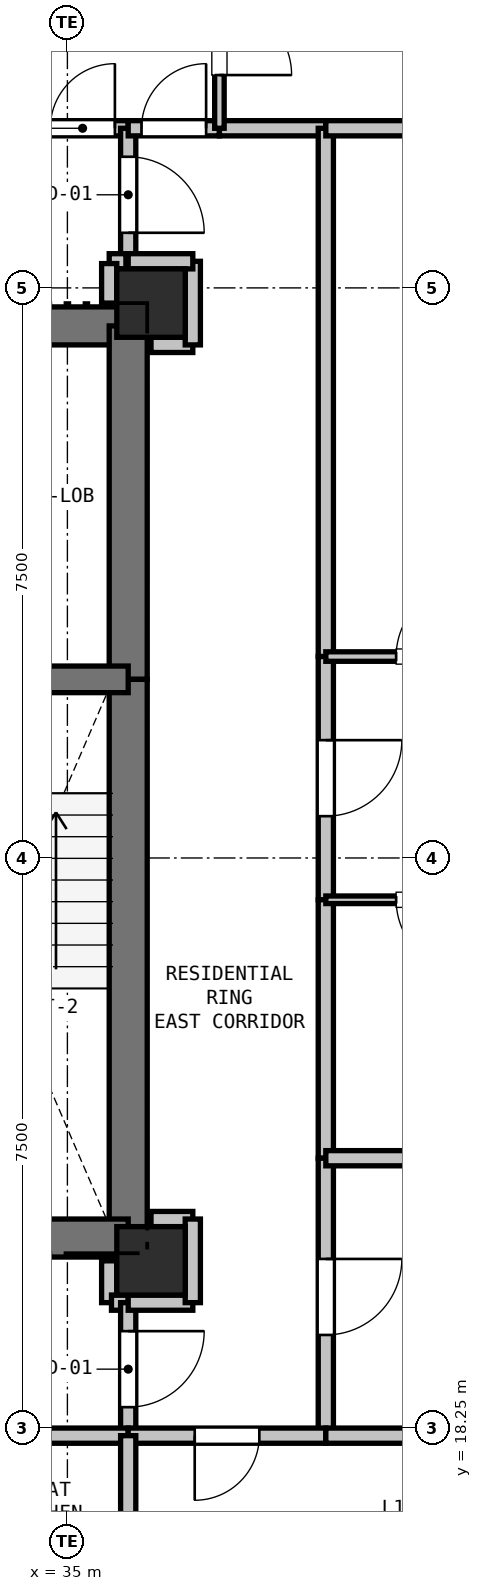
"""IFC4 building model, lengths in metres.
Left out: names, types, materials, properties, quantities, classifications, styles, units other than length and angle.
Written with IfcOpenShell. Run it as: python <this file> out.ifc"""

import sys

from ifc_helpers import new_model, si_unit, direction, frame, frame_2d, origin, origin_2d, place, context, subcontext, project, spatial, rectangle, extrude, element, fill, save


model = new_model("IFC4")
c1 = context("Model", 3, precision=1e-05, world=origin(), true_north=direction((0.0, 1.0)))
c2 = subcontext(c1, "Body", "Model", "MODEL_VIEW")
j1 = project(units=[si_unit("LENGTHUNIT", "METRE"), si_unit("PLANEANGLEUNIT", "RADIAN")], contexts=[c1])
p1 = place(None, origin())
s1 = spatial("IfcSite", under=j1, at=p1, CompositionType="ELEMENT")
p2 = place(p1, origin())
s2 = spatial("IfcBuilding", under=s1, at=p2, CompositionType="ELEMENT")
p3 = place(p2, frame((0.0, 0.0, 52.2)))
s3 = spatial("IfcBuildingStorey", under=s2, at=p3, CompositionType="ELEMENT", Elevation=52.2)
for number, where, z_axis, x_axis in (
    (1, (36.1, 33.05, 0.0), (0.0, 0.0, 1.0), (1.0, 0.0, 0.0)),
    (2, (36.1, 20.45, 0.0), (0.0, 0.0, 1.0), (1.0, 0.0, 0.0)),
):
    element("IfcColumn", number, at=place(p3, frame(where, z_axis=z_axis, x_axis=x_axis)), inside=s3, PredefinedType="COLUMN", context=c2, shape_type="SweptSolid", body=[
        extrude(rectangle(XDim=0.9, YDim=0.9, at=origin_2d()), origin(), (0.0, 0.0, 1.0), 3.3),
    ])
p4 = place(p3, frame((32.35, 32.75, 0.0), z_axis=(0.0, 0.0, 1.0), x_axis=(1.0, 0.0, 0.0)))
e3 = element("IfcWall", 3, at=p4, inside=s3, PredefinedType="SHEAR", context=c2, shape_type="SweptSolid", body=[
    extrude(rectangle(XDim=3.45, YDim=0.5, at=frame_2d((1.725, 0.0))), origin(), (0.0, 0.0, 1.0), 3.04),
])
p5 = place(p4, frame((0.65, 0.0, 0.0)))
e4 = element("IfcOpeningElement", 4, at=p5, cuts=e3, PredefinedType="OPENING", context=c2, shape_type="SweptSolid", body=[
    extrude(rectangle(XDim=1.15, YDim=2.15, at=frame_2d((0.575, 1.075))), frame((0.0, 0.26, 0.0), z_axis=(0.0, -1.0, 0.0), x_axis=(1.0, 0.0, 0.0)), (0.0, 0.0, 1.0), 0.52),
])
p6 = place(p3, frame((35.8, 32.75, 0.0), z_axis=(0.0, 0.0, 1.0), x_axis=(0.0, -1.0, 0.0)))
e5 = element("IfcWall", 5, at=p6, inside=s3, PredefinedType="SHEAR", context=c2, shape_type="SweptSolid", body=[
    extrude(rectangle(XDim=4.65, YDim=0.5, at=frame_2d((2.325, 0.0))), origin(), (0.0, 0.0, 1.0), 3.04),
])
p7 = place(p3, frame((35.8, 28.1, 0.0), z_axis=(0.0, 0.0, 1.0), x_axis=(0.0, -1.0, 0.0)))
e6 = element("IfcWall", 6, at=p7, inside=s3, PredefinedType="SHEAR", context=c2, shape_type="SweptSolid", body=[
    extrude(rectangle(XDim=7.35, YDim=0.5, at=frame_2d((3.675, 0.0))), origin(), (0.0, 0.0, 1.0), 3.04),
])
p8 = place(p3, frame((35.8, 20.75, 0.0), z_axis=(0.0, 0.0, 1.0), x_axis=(-1.0, 0.0, 0.0)))
e7 = element("IfcWall", 7, at=p8, inside=s3, PredefinedType="SHEAR", context=c2, shape_type="SweptSolid", body=[
    extrude(rectangle(XDim=3.45, YDim=0.5, at=frame_2d((1.725, 0.0))), origin(), (0.0, 0.0, 1.0), 3.04),
])
p9 = place(p3, frame((32.35, 28.1, 0.0), z_axis=(0.0, 0.0, 1.0), x_axis=(1.0, 0.0, 0.0)))
e8 = element("IfcWall", 8, at=p9, inside=s3, PredefinedType="SHEAR", context=c2, shape_type="SweptSolid", body=[
    extrude(rectangle(XDim=3.45, YDim=0.35, at=frame_2d((1.725, 0.0))), origin(), (0.0, 0.0, 1.0), 3.04),
])
p10 = place(p9, frame((1.15, 0.0, 0.0)))
e9 = element("IfcOpeningElement", 9, at=p10, cuts=e8, PredefinedType="OPENING", context=c2, shape_type="SweptSolid", body=[
    extrude(rectangle(XDim=1.15, YDim=2.15, at=frame_2d((0.575, 1.075))), frame((0.0, 0.185, 0.0), z_axis=(0.0, -1.0, 0.0), x_axis=(1.0, 0.0, 0.0)), (0.0, 0.0, 1.0), 0.37),
])
p11 = place(p3, frame((35.55, 20.45, 0.0), z_axis=(0.0, 0.0, 1.0), x_axis=(0.0, -1.0, 0.0)))
e10 = element("IfcWall", 10, at=p11, inside=s3, PredefinedType="PARTITIONING", context=c2, shape_type="SweptSolid", body=[
    extrude(rectangle(XDim=0.55, YDim=0.2, at=frame_2d((0.275, 0.0))), origin(), (0.0, 0.0, 1.0), 2.488),
])
p12 = place(p3, frame((35.58, 19.9, 0.0), z_axis=(0.0, 0.0, 1.0), x_axis=(1.0, 0.0, 0.0)))
e11 = element("IfcWall", 11, at=p12, inside=s3, PredefinedType="PARTITIONING", context=c2, shape_type="SweptSolid", body=[
    extrude(rectangle(XDim=0.22, YDim=0.2, at=frame_2d((0.11, 0.0))), origin(), (0.0, 0.0, 1.0), 3.04),
])
p13 = place(p3, frame((35.8, 19.9, 0.0), z_axis=(0.0, 0.0, 1.0), x_axis=(0.0, -1.0, 0.0)))
e12 = element("IfcWall", 12, at=p13, inside=s3, PredefinedType="PARTITIONING", context=c2, shape_type="SweptSolid", body=[
    extrude(rectangle(XDim=1.75, YDim=0.2, at=frame_2d((0.875, 0.0))), origin(), (0.0, 0.0, 1.0), 3.04),
])
p14 = place(p13, frame((0.375, 0.0, 0.0)))
e13 = element("IfcOpeningElement", 13, at=p14, cuts=e12, PredefinedType="OPENING", context=c2, shape_type="SweptSolid", body=[
    extrude(rectangle(XDim=1.0, YDim=2.15, at=frame_2d((0.5, 1.075))), frame((0.0, 0.11, 0.0), z_axis=(0.0, -1.0, 0.0), x_axis=(1.0, 0.0, 0.0)), (0.0, 0.0, 1.0), 0.22),
])
p15 = place(p3, frame((35.8, 18.15, 0.0), z_axis=(0.0, 0.0, 1.0), x_axis=(-1.0, 0.0, 0.0)))
e14 = element("IfcWall", 14, at=p15, inside=s3, PredefinedType="PARTITIONING", context=c2, shape_type="SweptSolid", body=[
    extrude(rectangle(XDim=3.6, YDim=0.2, at=frame_2d((1.8, 0.0))), origin(), (0.0, 0.0, 1.0), 3.04),
])
p16 = place(p3, frame((34.6, 35.35, 0.0), z_axis=(0.0, 0.0, 1.0), x_axis=(1.0, 0.0, 0.0)))
e15 = element("IfcWall", 15, at=p16, inside=s3, PredefinedType="PARTITIONING", context=c2, shape_type="SweptSolid", body=[
    extrude(rectangle(XDim=1.2, YDim=0.2, at=frame_2d((0.6, 0.0))), origin(), (0.0, 0.0, 1.0), 3.04),
])
p17 = place(p16, frame((0.175, 0.0, 0.0)))
e16 = element("IfcOpeningElement", 16, at=p17, cuts=e15, PredefinedType="OPENING", context=c2, shape_type="SweptSolid", body=[
    extrude(rectangle(XDim=0.85, YDim=2.1, at=frame_2d((0.425, 1.05))), frame((0.0, 0.11, 0.0), z_axis=(0.0, -1.0, 0.0), x_axis=(1.0, 0.0, 0.0)), (0.0, 0.0, 1.0), 0.22),
])
p18 = place(p3, frame((35.8, 35.35, 0.0), z_axis=(0.0, 0.0, 1.0), x_axis=(0.0, -1.0, 0.0)))
e17 = element("IfcWall", 17, at=p18, inside=s3, PredefinedType="PARTITIONING", context=c2, shape_type="SweptSolid", body=[
    extrude(rectangle(XDim=1.75, YDim=0.2, at=frame_2d((0.875, 0.0))), origin(), (0.0, 0.0, 1.0), 3.04),
])
p19 = place(p18, frame((0.375, 0.0, 0.0)))
e18 = element("IfcOpeningElement", 18, at=p19, cuts=e17, PredefinedType="OPENING", context=c2, shape_type="SweptSolid", body=[
    extrude(rectangle(XDim=1.0, YDim=2.15, at=frame_2d((0.5, 1.075))), frame((0.0, 0.11, 0.0), z_axis=(0.0, -1.0, 0.0), x_axis=(1.0, 0.0, 0.0)), (0.0, 0.0, 1.0), 0.22),
])
p20 = place(p3, frame((35.77, 33.6, 0.0), z_axis=(0.0, 0.0, 1.0), x_axis=(-1.0, 0.0, 0.0)))
e19 = element("IfcWall", 19, at=p20, inside=s3, PredefinedType="PARTITIONING", context=c2, shape_type="SweptSolid", body=[
    extrude(rectangle(XDim=0.22, YDim=0.2, at=frame_2d((0.11, 0.0))), origin(), (0.0, 0.0, 1.0), 3.04),
])
p21 = place(p3, frame((35.55, 33.57, 0.0), z_axis=(0.0, 0.0, 1.0), x_axis=(0.0, -1.0, 0.0)))
e20 = element("IfcWall", 20, at=p21, inside=s3, PredefinedType="PARTITIONING", context=c2, shape_type="SweptSolid", body=[
    extrude(rectangle(XDim=0.52, YDim=0.2, at=frame_2d((0.26, 0.0))), origin(), (0.0, 0.0, 1.0), 2.488),
])
for number, where, z_axis, x_axis in (
    (21, (36.65, 21.0, 0.0), (0.0, 0.0, 1.0), (-1.0, 0.0, 0.0)),
    (22, (36.1, 32.5, 0.0), (0.0, 0.0, 1.0), (1.0, 0.0, 0.0)),
):
    element("IfcWall", number, at=place(p3, frame(where, z_axis=z_axis, x_axis=x_axis)), inside=s3, PredefinedType="PARTITIONING", context=c2, shape_type="SweptSolid", body=[
        extrude(rectangle(XDim=0.55, YDim=0.2, at=frame_2d((0.275, 0.0))), origin(), (0.0, 0.0, 1.0), 2.488),
    ])
p22 = place(p3, frame((36.65, 32.5, 0.0), z_axis=(0.0, 0.0, 1.0), x_axis=(0.0, 1.0, 0.0)))
e23 = element("IfcWall", 23, at=p22, inside=s3, PredefinedType="PARTITIONING", context=c2, shape_type="SweptSolid", body=[
    extrude(rectangle(XDim=1.1, YDim=0.2, at=frame_2d((0.55, 0.0))), origin(), (0.0, 0.0, 1.0), 2.338),
])
p23 = place(p3, frame((36.65, 33.6, 0.0), z_axis=(0.0, 0.0, 1.0), x_axis=(-1.0, 0.0, 0.0)))
e24 = element("IfcWall", 24, at=p23, inside=s3, PredefinedType="PARTITIONING", context=c2, shape_type="SweptSolid", body=[
    extrude(rectangle(XDim=0.85, YDim=0.2, at=frame_2d((0.425, 0.0))), origin(), (0.0, 0.0, 1.0), 2.338),
])
p24 = place(p3, frame((35.8, 35.35, 0.0), z_axis=(0.0, 0.0, 1.0), x_axis=(1.0, 0.0, 0.0)))
e25 = element("IfcWall", 25, at=p24, inside=s3, PredefinedType="PARTITIONING", context=c2, shape_type="SweptSolid", body=[
    extrude(rectangle(XDim=1.2, YDim=0.2, at=frame_2d((0.6, 0.0))), origin(), (0.0, 0.0, 1.0), 2.338),
])
p25 = place(p24, frame((0.175, 0.0, 0.0)))
e26 = element("IfcOpeningElement", 26, at=p25, cuts=e25, PredefinedType="OPENING", context=c2, shape_type="SweptSolid", body=[
    extrude(rectangle(XDim=0.85, YDim=2.1, at=frame_2d((0.425, 1.05))), frame((0.0, 0.11, 0.0), z_axis=(0.0, -1.0, 0.0), x_axis=(1.0, 0.0, 0.0)), (0.0, 0.0, 1.0), 0.22),
])
p26 = place(p3, frame((37.0, 35.35, 0.0), z_axis=(0.0, 0.0, 1.0), x_axis=(1.0, 0.0, 0.0)))
e27 = element("IfcWall", 27, at=p26, inside=s3, PredefinedType="PARTITIONING", context=c2, shape_type="SweptSolid", body=[
    extrude(rectangle(XDim=1.4, YDim=0.2, at=frame_2d((0.7, 0.0))), origin(), (0.0, 0.0, 1.0), 2.338),
])
p27 = place(p3, frame((38.4, 35.35, 0.0), z_axis=(0.0, 0.0, 1.0), x_axis=(0.0, -1.0, 0.0)))
e28 = element("IfcWall", 28, at=p27, inside=s3, PredefinedType="PARTITIONING", context=c2, shape_type="SweptSolid", body=[
    extrude(rectangle(XDim=6.95, YDim=0.2, at=frame_2d((3.475, 0.0))), origin(), (0.0, 0.0, 1.0), 2.338),
])
p28 = place(p3, frame((38.4, 28.4, 0.0), z_axis=(0.0, 0.0, 1.0), x_axis=(0.0, -1.0, 0.0)))
e29 = element("IfcWall", 29, at=p28, inside=s3, PredefinedType="PARTITIONING", context=c2, shape_type="SweptSolid", body=[
    extrude(rectangle(XDim=3.2, YDim=0.2, at=frame_2d((1.6, 0.0))), origin(), (0.0, 0.0, 1.0), 3.04),
])
p29 = place(p28, frame((1.1, 0.0, 0.0)))
e30 = element("IfcOpeningElement", 30, at=p29, cuts=e29, PredefinedType="OPENING", context=c2, shape_type="SweptSolid", body=[
    extrude(rectangle(XDim=1.0, YDim=2.15, at=frame_2d((0.5, 1.075))), frame((0.0, 0.11, 0.0), z_axis=(0.0, -1.0, 0.0), x_axis=(1.0, 0.0, 0.0)), (0.0, 0.0, 1.0), 0.22),
])
p30 = place(p3, frame((38.4, 25.2, 0.0), z_axis=(0.0, 0.0, 1.0), x_axis=(0.0, -1.0, 0.0)))
e31 = element("IfcWall", 31, at=p30, inside=s3, PredefinedType="PARTITIONING", context=c2, shape_type="SweptSolid", body=[
    extrude(rectangle(XDim=3.4, YDim=0.2, at=frame_2d((1.7, 0.0))), origin(), (0.0, 0.0, 1.0), 3.04),
])
p31 = place(p3, frame((38.4, 21.8, 0.0), z_axis=(0.0, 0.0, 1.0), x_axis=(0.0, -1.0, 0.0)))
e32 = element("IfcWall", 32, at=p31, inside=s3, PredefinedType="PARTITIONING", context=c2, shape_type="SweptSolid", body=[
    extrude(rectangle(XDim=3.65, YDim=0.2, at=frame_2d((1.825, 0.0))), origin(), (0.0, 0.0, 1.0), 3.04),
])
p32 = place(p31, frame((1.325, 0.0, 0.0)))
e33 = element("IfcOpeningElement", 33, at=p32, cuts=e32, PredefinedType="OPENING", context=c2, shape_type="SweptSolid", body=[
    extrude(rectangle(XDim=1.0, YDim=2.15, at=frame_2d((0.5, 1.075))), frame((0.0, 0.11, 0.0), z_axis=(0.0, -1.0, 0.0), x_axis=(1.0, 0.0, 0.0)), (0.0, 0.0, 1.0), 0.22),
])
p33 = place(p3, frame((38.4, 18.15, 0.0), z_axis=(0.0, 0.0, 1.0), x_axis=(-1.0, 0.0, 0.0)))
e34 = element("IfcWall", 34, at=p33, inside=s3, PredefinedType="PARTITIONING", context=c2, shape_type="SweptSolid", body=[
    extrude(rectangle(XDim=2.6, YDim=0.2, at=frame_2d((1.3, 0.0))), origin(), (0.0, 0.0, 1.0), 2.338),
])
p34 = place(p33, frame((0.875, 0.0, 0.0)))
e35 = element("IfcOpeningElement", 35, at=p34, cuts=e34, PredefinedType="OPENING", context=c2, shape_type="SweptSolid", body=[
    extrude(rectangle(XDim=0.85, YDim=2.1, at=frame_2d((0.425, 1.05))), frame((0.0, 0.11, 0.0), z_axis=(0.0, -1.0, 0.0), x_axis=(1.0, 0.0, 0.0)), (0.0, 0.0, 1.0), 0.22),
])
p35 = place(p3, frame((35.8, 19.9, 0.0), z_axis=(0.0, 0.0, 1.0), x_axis=(1.0, 0.0, 0.0)))
e36 = element("IfcWall", 36, at=p35, inside=s3, PredefinedType="PARTITIONING", context=c2, shape_type="SweptSolid", body=[
    extrude(rectangle(XDim=0.85, YDim=0.2, at=frame_2d((0.425, 0.0))), origin(), (0.0, 0.0, 1.0), 2.338),
])
p36 = place(p3, frame((36.65, 19.9, 0.0), z_axis=(0.0, 0.0, 1.0), x_axis=(0.0, 1.0, 0.0)))
e37 = element("IfcWall", 37, at=p36, inside=s3, PredefinedType="PARTITIONING", context=c2, shape_type="SweptSolid", body=[
    extrude(rectangle(XDim=1.1, YDim=0.2, at=frame_2d((0.55, 0.0))), origin(), (0.0, 0.0, 1.0), 3.04),
])
p37 = place(p3, frame((37.0, 37.7, 0.0), z_axis=(0.0, 0.0, 1.0), x_axis=(0.0, -1.0, 0.0)))
e38 = element("IfcWall", 38, at=p37, inside=s3, PredefinedType="PARTITIONING", context=c2, shape_type="SweptSolid", body=[
    extrude(rectangle(XDim=2.35, YDim=0.125, at=frame_2d((1.175, 0.0))), origin(), (0.0, 0.0, 1.0), 2.338),
])
p38 = place(p37, frame((0.7, 0.0, 0.0)))
e39 = element("IfcOpeningElement", 39, at=p38, cuts=e38, PredefinedType="OPENING", context=c2, shape_type="SweptSolid", body=[
    extrude(rectangle(XDim=0.95, YDim=2.1, at=frame_2d((0.475, 1.05))), frame((0.0, 0.073, 0.0), z_axis=(0.0, -1.0, 0.0), x_axis=(1.0, 0.0, 0.0)), (0.0, 0.0, 1.0), 0.145),
])
p39 = place(p3, frame((41.2, 25.2, 0.0), z_axis=(0.0, 0.0, 1.0), x_axis=(-1.0, 0.0, 0.0)))
e40 = element("IfcWall", 40, at=p39, inside=s3, PredefinedType="PARTITIONING", context=c2, shape_type="SweptSolid", body=[
    extrude(rectangle(XDim=2.8, YDim=0.1, at=frame_2d((1.4, 0.0))), origin(), (0.0, 0.0, 1.0), 3.04),
])
p40 = place(p39, frame((0.925, 0.0, 0.0)))
e41 = element("IfcOpeningElement", 41, at=p40, cuts=e40, PredefinedType="OPENING", context=c2, shape_type="SweptSolid", body=[
    extrude(rectangle(XDim=0.95, YDim=2.1, at=frame_2d((0.475, 1.05))), frame((0.0, 0.06, 0.0), z_axis=(0.0, -1.0, 0.0), x_axis=(1.0, 0.0, 0.0)), (0.0, 0.0, 1.0), 0.12),
])
p41 = place(p3, frame((38.4, 28.4, 0.0), z_axis=(0.0, 0.0, 1.0), x_axis=(1.0, 0.0, 0.0)))
e42 = element("IfcWall", 42, at=p41, inside=s3, PredefinedType="PARTITIONING", context=c2, shape_type="SweptSolid", body=[
    extrude(rectangle(XDim=2.8, YDim=0.125, at=frame_2d((1.4, 0.0))), origin(), (0.0, 0.0, 1.0), 3.04),
])
p42 = place(p41, frame((0.925, 0.0, 0.0)))
e43 = element("IfcOpeningElement", 43, at=p42, cuts=e42, PredefinedType="OPENING", context=c2, shape_type="SweptSolid", body=[
    extrude(rectangle(XDim=0.95, YDim=2.1, at=frame_2d((0.475, 1.05))), frame((0.0, 0.073, 0.0), z_axis=(0.0, -1.0, 0.0), x_axis=(1.0, 0.0, 0.0)), (0.0, 0.0, 1.0), 0.145),
])
p43 = place(p3, frame((43.688, 35.35, 0.0), z_axis=(0.0, 0.0, 1.0), x_axis=(-1.0, 0.0, 0.0)))
e44 = element("IfcWall", 44, at=p43, inside=s3, PredefinedType="PARTITIONING", context=c2, shape_type="SweptSolid", body=[
    extrude(rectangle(XDim=5.289, YDim=0.2, at=frame_2d((2.644, 0.0))), origin(), (0.0, 0.0, 1.0), 2.338),
])
p44 = place(p3, frame((35.8, 18.15, 0.0), z_axis=(0.0, 0.0, 1.0), x_axis=(0.0, -1.0, 0.0)))
e45 = element("IfcWall", 45, at=p44, inside=s3, PredefinedType="PARTITIONING", context=c2, shape_type="SweptSolid", body=[
    extrude(rectangle(XDim=2.55, YDim=0.2, at=frame_2d((1.275, 0.0))), origin(), (0.0, 0.0, 1.0), 3.04),
])
p45 = place(p3, frame((43.814, 21.8, 0.0), z_axis=(0.0, 0.0, 1.0), x_axis=(-1.0, 0.0, 0.0)))
e46 = element("IfcWall", 46, at=p45, inside=s3, PredefinedType="PARTITIONING", context=c2, shape_type="SweptSolid", body=[
    extrude(rectangle(XDim=5.414, YDim=0.2, at=frame_2d((2.707, 0.0))), origin(), (0.0, 0.0, 1.0), 2.365),
])
p46 = place(p3, frame((38.4, 18.15, 0.0), z_axis=(0.0, 0.0, 1.0), x_axis=(1.0, 0.0, 0.0)))
e47 = element("IfcWall", 47, at=p46, inside=s3, PredefinedType="PARTITIONING", context=c2, shape_type="SweptSolid", body=[
    extrude(rectangle(XDim=5.289, YDim=0.2, at=frame_2d((2.644, 0.0))), origin(), (0.0, 0.0, 1.0), 2.365),
])
p47 = place(p14, origin())
e48 = element("IfcDoor", 48, at=p47, inside=s3, OperationType="SINGLE_SWING_LEFT", PredefinedType="DOOR", context=c2, shape_type="SweptSolid", body=[
    extrude(rectangle(XDim=1.0, YDim=2.15, at=frame_2d((0.5, 1.075))), frame((0.0, 0.025, 0.0), z_axis=(0.0, -1.0, 0.0), x_axis=(1.0, 0.0, 0.0)), (0.0, 0.0, 1.0), 0.05),
])
fill(e13, e48)
p48 = place(p19, origin())
e49 = element("IfcDoor", 49, at=p48, inside=s3, OperationType="SINGLE_SWING_RIGHT", PredefinedType="DOOR", context=c2, shape_type="SweptSolid", body=[
    extrude(rectangle(XDim=1.0, YDim=2.15, at=frame_2d((0.5, 1.075))), frame((0.0, 0.025, 0.0), z_axis=(0.0, -1.0, 0.0), x_axis=(1.0, 0.0, 0.0)), (0.0, 0.0, 1.0), 0.05),
])
fill(e18, e49)
p49 = place(p17, origin())
e50 = element("IfcDoor", 50, at=p49, inside=s3, OperationType="SINGLE_SWING_RIGHT", PredefinedType="DOOR", context=c2, shape_type="SweptSolid", body=[
    extrude(rectangle(XDim=0.85, YDim=2.1, at=frame_2d((0.425, 1.05))), frame((0.0, 0.025, 0.0), z_axis=(0.0, -1.0, 0.0), x_axis=(1.0, 0.0, 0.0)), (0.0, 0.0, 1.0), 0.05),
])
fill(e16, e50)
p50 = place(p25, origin())
e51 = element("IfcDoor", 51, at=p50, inside=s3, OperationType="SINGLE_SWING_RIGHT", PredefinedType="DOOR", context=c2, shape_type="SweptSolid", body=[
    extrude(rectangle(XDim=0.85, YDim=2.1, at=frame_2d((0.425, 1.05))), frame((0.0, 0.025, 0.0), z_axis=(0.0, -1.0, 0.0), x_axis=(1.0, 0.0, 0.0)), (0.0, 0.0, 1.0), 0.05),
])
fill(e26, e51)
p51 = place(p29, origin())
e52 = element("IfcDoor", 52, at=p51, inside=s3, OperationType="SINGLE_SWING_LEFT", PredefinedType="DOOR", context=c2, shape_type="SweptSolid", body=[
    extrude(rectangle(XDim=1.0, YDim=2.15, at=frame_2d((0.5, 1.075))), frame((0.0, 0.025, 0.0), z_axis=(0.0, -1.0, 0.0), x_axis=(1.0, 0.0, 0.0)), (0.0, 0.0, 1.0), 0.05),
])
fill(e30, e52)
p52 = place(p34, origin())
e53 = element("IfcDoor", 53, at=p52, inside=s3, OperationType="SINGLE_SWING_RIGHT", PredefinedType="DOOR", context=c2, shape_type="SweptSolid", body=[
    extrude(rectangle(XDim=0.85, YDim=2.1, at=frame_2d((0.425, 1.05))), frame((0.0, 0.025, 0.0), z_axis=(0.0, -1.0, 0.0), x_axis=(1.0, 0.0, 0.0)), (0.0, 0.0, 1.0), 0.05),
])
fill(e35, e53)
p53 = place(p32, origin())
e54 = element("IfcDoor", 54, at=p53, inside=s3, OperationType="SINGLE_SWING_LEFT", PredefinedType="DOOR", context=c2, shape_type="SweptSolid", body=[
    extrude(rectangle(XDim=1.0, YDim=2.15, at=frame_2d((0.5, 1.075))), frame((0.0, 0.025, 0.0), z_axis=(0.0, -1.0, 0.0), x_axis=(1.0, 0.0, 0.0)), (0.0, 0.0, 1.0), 0.05),
])
fill(e33, e54)
p54 = place(p38, origin())
e55 = element("IfcDoor", 55, at=p54, inside=s3, OperationType="SINGLE_SWING_RIGHT", PredefinedType="DOOR", context=c2, shape_type="SweptSolid", body=[
    extrude(rectangle(XDim=0.95, YDim=2.1, at=frame_2d((0.475, 1.05))), frame((0.0, 0.025, 0.0), z_axis=(0.0, -1.0, 0.0), x_axis=(1.0, 0.0, 0.0)), (0.0, 0.0, 1.0), 0.05),
])
fill(e39, e55)
p55 = place(p40, origin())
e56 = element("IfcDoor", 56, at=p55, inside=s3, OperationType="SINGLE_SWING_LEFT", PredefinedType="DOOR", context=c2, shape_type="SweptSolid", body=[
    extrude(rectangle(XDim=0.95, YDim=2.1, at=frame_2d((0.475, 1.05))), frame((0.0, 0.025, 0.0), z_axis=(0.0, -1.0, 0.0), x_axis=(1.0, 0.0, 0.0)), (0.0, 0.0, 1.0), 0.05),
])
fill(e41, e56)
p56 = place(p42, origin())
e57 = element("IfcDoor", 57, at=p56, inside=s3, OperationType="SINGLE_SWING_RIGHT", PredefinedType="DOOR", context=c2, shape_type="SweptSolid", body=[
    extrude(rectangle(XDim=0.95, YDim=2.1, at=frame_2d((0.475, 1.05))), frame((0.0, 0.025, 0.0), z_axis=(0.0, -1.0, 0.0), x_axis=(1.0, 0.0, 0.0)), (0.0, 0.0, 1.0), 0.05),
])
fill(e43, e57)
save(model, sys.argv[1])
